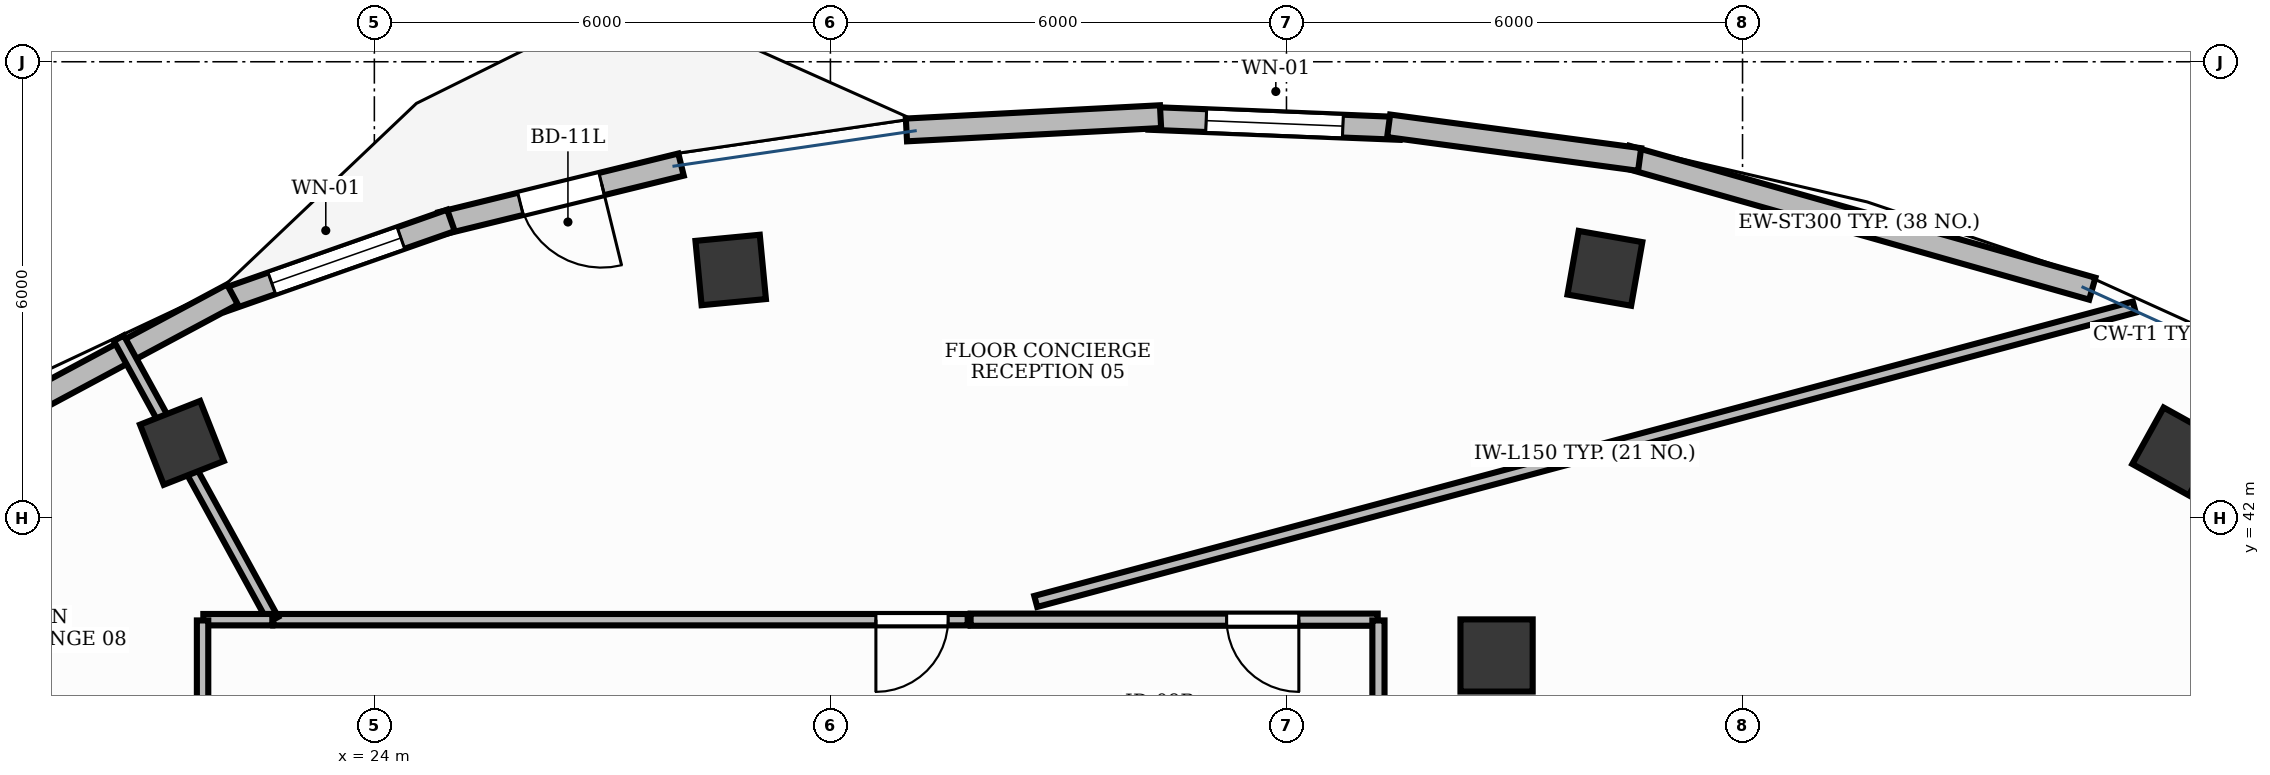
"""IFC4 building model, lengths in metres.
Left out: names, types, materials, properties, quantities, classifications, styles, units other than length and angle.
Written with IfcOpenShell. Run it as: python <this file> out.ifc"""

import sys

from ifc_helpers import new_model, si_unit, direction, frame, frame_2d, origin, origin_2d, place, context, subcontext, project, spatial, rectangle, extrude, element, fill, save


model = new_model("IFC4")
c1 = context("Model", 3, precision=1e-05, world=origin(), true_north=direction((0.0, 1.0)))
c2 = subcontext(c1, "Body", "Model", "MODEL_VIEW")
j1 = project(units=[si_unit("LENGTHUNIT", "METRE"), si_unit("PLANEANGLEUNIT", "RADIAN")], contexts=[c1])
p1 = place(None, origin())
s1 = spatial("IfcSite", under=j1, at=p1, CompositionType="ELEMENT")
p2 = place(p1, origin())
s2 = spatial("IfcBuilding", under=s1, at=p2, CompositionType="ELEMENT")
p3 = place(p2, frame((0.0, 0.0, 273.0)))
s3 = spatial("IfcBuildingStorey", under=s2, at=p3, CompositionType="ELEMENT", Elevation=273.0)
for number, where, z_axis, x_axis in (
    (1, (47.706, 42.873, -0.0), (0.0, 0.0, 1.0), (-0.875, 0.485, 0.0)),
    (2, (40.189, 45.282, -0.0), (0.0, 0.0, 1.0), (-0.985, 0.173, 0.0)),
):
    element("IfcColumn", number, at=place(p3, frame(where, z_axis=z_axis, x_axis=x_axis)), inside=s3, PredefinedType="COLUMN", context=c2, shape_type="SweptSolid", body=[
        extrude(rectangle(XDim=0.85, YDim=0.85, at=origin_2d()), origin(), (0.0, 0.0, 1.0), 3.881),
    ])
p4 = place(p3, frame((38.764, 40.189, -0.0), z_axis=(0.0, 0.0, 1.0), x_axis=(1.0, 0.0, 0.0)))
e3 = element("IfcColumn", 3, at=p4, inside=s3, PredefinedType="COLUMN", context=c2, shape_type="SweptSolid", body=[
    extrude(rectangle(XDim=0.95, YDim=0.95, at=origin_2d()), origin(), (0.0, 0.0, 1.0), 3.881),
])
for number, where, z_axis, x_axis in (
    (4, (28.688, 45.261, -0.0), (0.0, 0.0, 1.0), (0.995, 0.095, 0.0)),
    (5, (21.469, 42.986, -0.0), (0.0, 0.0, 1.0), (0.93, 0.367, 0.0)),
):
    element("IfcColumn", number, at=place(p3, frame(where, z_axis=z_axis, x_axis=x_axis)), inside=s3, PredefinedType="COLUMN", context=c2, shape_type="SweptSolid", body=[
        extrude(rectangle(XDim=0.85, YDim=0.85, at=origin_2d()), origin(), (0.0, 0.0, 1.0), 3.881),
    ])
p5 = place(p3, frame((37.496, 47.123, 0.0), z_axis=(0.0, 0.0, 1.0), x_axis=(-0.999191145847, 0.040212610729, 0.0)))
e6 = element("IfcWall", 6, at=p5, inside=s3, PredefinedType="STANDARD", context=c2, shape_type="SweptSolid", body=[
    extrude(rectangle(XDim=3.309, YDim=0.3, at=frame_2d((1.654, 0.0))), origin(), (0.0, 0.0, 1.0), 3.88),
])
p6 = place(p5, frame((0.754, 0.0, 0.9)))
e7 = element("IfcOpeningElement", 7, at=p6, cuts=e6, PredefinedType="OPENING", context=c2, shape_type="SweptSolid", body=[
    extrude(rectangle(XDim=1.8, YDim=2.1, at=frame_2d((0.9, 1.05))), frame((0.0, 0.165, 0.0), z_axis=(0.0, -1.0, 0.0), x_axis=(1.0, 0.0, 0.0)), (0.0, 0.0, 1.0), 0.33),
])
p7 = place(p3, frame((28.035, 46.647, 0.0), z_axis=(0.0, 0.0, 1.0), x_axis=(-0.971310768778, -0.237813772636, 0.0)))
e8 = element("IfcWall", 8, at=p7, inside=s3, PredefinedType="STANDARD", context=c2, shape_type="SweptSolid", body=[
    extrude(rectangle(XDim=3.25, YDim=0.3, at=frame_2d((1.625, 0.0))), origin(), (0.0, 0.0, 1.0), 3.88),
])
p8 = place(p7, frame((1.075, 0.0, 0.0)))
e9 = element("IfcOpeningElement", 9, at=p8, cuts=e8, PredefinedType="OPENING", context=c2, shape_type="SweptSolid", body=[
    extrude(rectangle(XDim=1.1, YDim=2.15, at=frame_2d((0.55, 1.075))), frame((0.0, 0.165, 0.0), z_axis=(0.0, -1.0, 0.0), x_axis=(1.0, 0.0, 0.0)), (0.0, 0.0, 1.0), 0.33),
])
p9 = place(p3, frame((25.008, 45.913, 0.0), z_axis=(0.0, 0.0, 1.0), x_axis=(-0.943473052448, -0.331449240917, 0.0)))
e10 = element("IfcWall", 10, at=p9, inside=s3, PredefinedType="STANDARD", context=c2, shape_type="SweptSolid", body=[
    extrude(rectangle(XDim=3.196, YDim=0.3, at=frame_2d((1.598, 0.0))), origin(), (0.0, 0.0, 1.0), 3.88),
])
p10 = place(p9, frame((0.698, 0.0, 0.9)))
e11 = element("IfcOpeningElement", 11, at=p10, cuts=e10, PredefinedType="OPENING", context=c2, shape_type="SweptSolid", body=[
    extrude(rectangle(XDim=1.8, YDim=2.1, at=frame_2d((0.9, 1.05))), frame((0.0, 0.165, 0.0), z_axis=(0.0, -1.0, 0.0), x_axis=(1.0, 0.0, 0.0)), (0.0, 0.0, 1.0), 0.33),
])
p11 = place(p3, frame((46.602, 45.014, 0.0), z_axis=(0.0, 0.0, 1.0), x_axis=(-0.962160382219, 0.272483758943, 0.0)))
e12 = element("IfcWall", 12, at=p11, inside=s3, PredefinedType="STANDARD", context=c2, shape_type="SweptSolid", body=[
    extrude(rectangle(XDim=6.372, YDim=0.3, at=frame_2d((3.186, 0.0))), origin(), (0.0, 0.0, 1.0), 3.88),
])
p12 = place(p3, frame((40.646, 46.714, 0.0), z_axis=(0.0, 0.0, 1.0), x_axis=(-0.991133560493, 0.132869354124, 0.0)))
e13 = element("IfcWall", 13, at=p12, inside=s3, PredefinedType="STANDARD", context=c2, shape_type="SweptSolid", body=[
    extrude(rectangle(XDim=3.331, YDim=0.3, at=frame_2d((1.666, 0.0))), origin(), (0.0, 0.0, 1.0), 3.88),
])
p13 = place(p3, frame((34.343, 47.278, 0.0), z_axis=(0.0, 0.0, 1.0), x_axis=(-0.998635900459, -0.052214349695, 0.0)))
e14 = element("IfcWall", 14, at=p13, inside=s3, PredefinedType="STANDARD", context=c2, shape_type="SweptSolid", body=[
    extrude(rectangle(XDim=3.348, YDim=0.3, at=frame_2d((1.674, 0.0))), origin(), (0.0, 0.0, 1.0), 3.88),
])
p14 = place(p3, frame((22.133, 44.939, 0.0), z_axis=(0.0, 0.0, 1.0), x_axis=(-0.881337457, -0.472487340454, 0.0)))
e15 = element("IfcWall", 15, at=p14, inside=s3, PredefinedType="STANDARD", context=c2, shape_type="SweptSolid", body=[
    extrude(rectangle(XDim=6.088, YDim=0.3, at=frame_2d((3.044, 0.0))), origin(), (0.0, 0.0, 1.0), 3.88),
])
p15 = place(p3, frame((31.806, 40.66, 0.0), z_axis=(0.0, 0.0, 1.0), x_axis=(-1.0, 0.0, 0.0)))
e16 = element("IfcWall", 16, at=p15, inside=s3, PredefinedType="PARTITIONING", context=c2, shape_type="SweptSolid", body=[
    extrude(rectangle(XDim=9.136, YDim=0.15, at=frame_2d((4.568, 0.0))), origin(), (0.0, 0.0, 1.0), 2.89),
])
p16 = place(p15, frame((0.257, 0.0, 0.0)))
e17 = element("IfcOpeningElement", 17, at=p16, cuts=e16, PredefinedType="OPENING", context=c2, shape_type="SweptSolid", body=[
    extrude(rectangle(XDim=0.95, YDim=2.15, at=frame_2d((0.475, 1.075))), frame((0.0, 0.09, 0.0), z_axis=(0.0, -1.0, 0.0), x_axis=(1.0, 0.0, 0.0)), (0.0, 0.0, 1.0), 0.18),
])
p17 = place(p3, frame((37.2, 40.66, 0.0), z_axis=(0.0, 0.0, 1.0), x_axis=(-1.0, 0.0, 0.0)))
e18 = element("IfcWall", 18, at=p17, inside=s3, PredefinedType="PARTITIONING", context=c2, shape_type="SweptSolid", body=[
    extrude(rectangle(XDim=5.355, YDim=0.16, at=frame_2d((2.678, 0.0))), origin(), (0.0, 0.0, 1.0), 2.89),
])
p18 = place(p17, frame((1.037, 0.0, 0.0)))
e19 = element("IfcOpeningElement", 19, at=p18, cuts=e18, PredefinedType="OPENING", context=c2, shape_type="SweptSolid", body=[
    extrude(rectangle(XDim=0.95, YDim=2.15, at=frame_2d((0.475, 1.075))), frame((0.0, 0.095, 0.0), z_axis=(0.0, -1.0, 0.0), x_axis=(1.0, 0.0, 0.0)), (0.0, 0.0, 1.0), 0.19),
])
p19 = place(p3, frame((47.154, 44.772, 0.0), z_axis=(0.0, 0.0, 1.0), x_axis=(-0.965924962881, -0.258822267365, 0.0)))
e20 = element("IfcWall", 20, at=p19, inside=s3, PredefinedType="PARTITIONING", context=c2, shape_type="SweptSolid", body=[
    extrude(rectangle(XDim=14.962, YDim=0.15, at=frame_2d((7.481, 0.0))), origin(), (0.0, 0.0, 1.0), 2.89),
])
p20 = place(p3, frame((22.669, 40.66, 0.0), z_axis=(0.0, 0.0, 1.0), x_axis=(-0.480944413436, 0.8767510885, 0.0)))
e21 = element("IfcWall", 21, at=p20, inside=s3, PredefinedType="PARTITIONING", context=c2, shape_type="SweptSolid", body=[
    extrude(rectangle(XDim=4.224, YDim=0.15, at=frame_2d((2.112, 0.0))), origin(), (0.0, 0.0, 1.0), 2.89),
])
p21 = place(p3, frame((37.21, 38.1, 0.0), z_axis=(0.0, 0.0, 1.0), x_axis=(0.0, 1.0, 0.0)))
e22 = element("IfcWall", 22, at=p21, inside=s3, PredefinedType="PARTITIONING", context=c2, shape_type="SweptSolid", body=[
    extrude(rectangle(XDim=2.55, YDim=0.16, at=frame_2d((1.275, 0.0))), origin(), (0.0, 0.0, 1.0), 2.89),
])
p22 = place(p3, frame((22.658, 40.66, 0.0), z_axis=(0.0, 0.0, 1.0), x_axis=(-1.0, 0.0, 0.0)))
e23 = element("IfcWall", 23, at=p22, inside=s3, PredefinedType="PARTITIONING", context=c2, shape_type="SweptSolid", body=[
    extrude(rectangle(XDim=0.908, YDim=0.15, at=frame_2d((0.454, 0.0))), origin(), (0.0, 0.0, 1.0), 2.89),
])
p23 = place(p3, frame((21.74, 40.65, 0.0), z_axis=(0.0, 0.0, 1.0), x_axis=(0.0, -1.0, 0.0)))
e24 = element("IfcWall", 24, at=p23, inside=s3, PredefinedType="PARTITIONING", context=c2, shape_type="SweptSolid", body=[
    extrude(rectangle(XDim=5.808, YDim=0.15, at=frame_2d((2.904, 0.0))), origin(), (0.0, 0.0, 1.0), 2.89),
])
p24 = place(p6, origin())
e25 = element("IfcWindow", 25, at=p24, inside=s3, PartitioningType="SINGLE_PANEL", PredefinedType="WINDOW", context=c2, shape_type="SweptSolid", body=[
    extrude(rectangle(XDim=1.8, YDim=2.1, at=frame_2d((0.9, 1.05))), frame((0.0, 0.03, 0.0), z_axis=(0.0, -1.0, 0.0), x_axis=(1.0, 0.0, 0.0)), (0.0, 0.0, 1.0), 0.06),
])
fill(e7, e25)
p25 = place(p8, origin())
e26 = element("IfcDoor", 26, at=p25, inside=s3, OperationType="SINGLE_SWING_LEFT", PredefinedType="DOOR", context=c2, shape_type="SweptSolid", body=[
    extrude(rectangle(XDim=1.1, YDim=2.15, at=frame_2d((0.55, 1.075))), frame((0.0, 0.025, 0.0), z_axis=(0.0, -1.0, 0.0), x_axis=(1.0, 0.0, 0.0)), (0.0, 0.0, 1.0), 0.05),
])
fill(e9, e26)
p26 = place(p10, origin())
e27 = element("IfcWindow", 27, at=p26, inside=s3, PartitioningType="SINGLE_PANEL", PredefinedType="WINDOW", context=c2, shape_type="SweptSolid", body=[
    extrude(rectangle(XDim=1.8, YDim=2.1, at=frame_2d((0.9, 1.05))), frame((0.0, 0.03, 0.0), z_axis=(0.0, -1.0, 0.0), x_axis=(1.0, 0.0, 0.0)), (0.0, 0.0, 1.0), 0.06),
])
fill(e11, e27)
p27 = place(p16, origin())
e28 = element("IfcDoor", 28, at=p27, inside=s3, OperationType="SINGLE_SWING_RIGHT", PredefinedType="DOOR", context=c2, shape_type="SweptSolid", body=[
    extrude(rectangle(XDim=0.95, YDim=2.15, at=frame_2d((0.475, 1.075))), frame((0.0, 0.025, 0.0), z_axis=(0.0, -1.0, 0.0), x_axis=(1.0, 0.0, 0.0)), (0.0, 0.0, 1.0), 0.05),
])
fill(e17, e28)
p28 = place(p18, origin())
e29 = element("IfcDoor", 29, at=p28, inside=s3, OperationType="SINGLE_SWING_LEFT", PredefinedType="DOOR", context=c2, shape_type="SweptSolid", body=[
    extrude(rectangle(XDim=0.95, YDim=2.15, at=frame_2d((0.475, 1.075))), frame((0.0, 0.025, 0.0), z_axis=(0.0, -1.0, 0.0), x_axis=(1.0, 0.0, 0.0)), (0.0, 0.0, 1.0), 0.05),
])
fill(e19, e29)
save(model, sys.argv[1])
